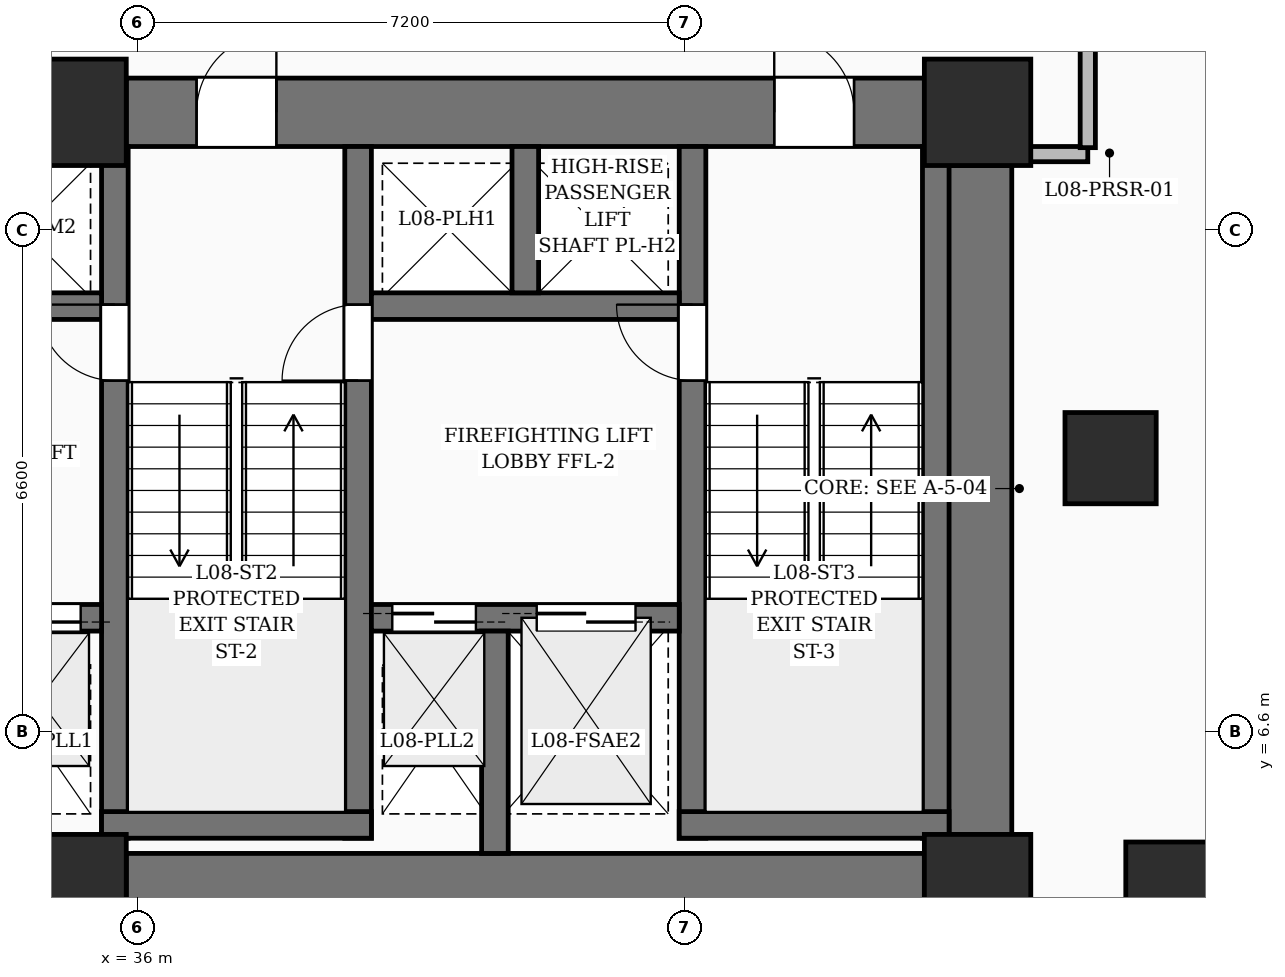
"""IFC4 building model, lengths in metres.
Left out: names, types, materials, properties, quantities, classifications, styles, units other than length and angle.
Written with IfcOpenShell. Run it as: python <this file> out.ifc"""

import sys

from ifc_helpers import new_model, si_unit, direction, frame, frame_2d, origin, origin_2d, place, context, subcontext, project, spatial, rectangle, extrude, element, fill, save


model = new_model("IFC4")
c1 = context("Model", 3, precision=1e-05, world=origin(), true_north=direction((0.0, 1.0)))
c2 = subcontext(c1, "Body", "Model", "MODEL_VIEW")
j1 = project(units=[si_unit("LENGTHUNIT", "METRE"), si_unit("PLANEANGLEUNIT", "RADIAN")], contexts=[c1])
p1 = place(None, origin())
s1 = spatial("IfcSite", under=j1, at=p1, CompositionType="ELEMENT")
p2 = place(p1, origin())
s2 = spatial("IfcBuilding", under=s1, at=p2, CompositionType="ELEMENT")
p3 = place(p2, frame((0.0, 0.0, 39.0)))
s3 = spatial("IfcBuildingStorey", under=s2, at=p3, CompositionType="ELEMENT", Elevation=39.0)
for number, where, z_axis, x_axis in (
    (1, (35.15, 4.55, 0.0), (0.0, 0.0, 1.0), (1.0, 0.0, 0.0)),
    (2, (47.05, 4.55, 0.0), (0.0, 0.0, 1.0), (1.0, 0.0, 0.0)),
    (3, (35.15, 14.75, 0.0), (0.0, 0.0, 1.0), (1.0, 0.0, 0.0)),
    (4, (47.05, 14.75, 0.0), (0.0, 0.0, 1.0), (1.0, 0.0, 0.0)),
):
    element("IfcColumn", number, at=place(p3, frame(where, z_axis=z_axis, x_axis=x_axis)), inside=s3, PredefinedType="COLUMN", context=c2, shape_type="SweptSolid", body=[
        extrude(rectangle(XDim=1.4, YDim=1.4, at=origin_2d()), origin(), (0.0, 0.0, 1.0), 3.6),
    ])
for number, where, z_axis, x_axis in (
    (5, (49.6, 4.55, 0.0), (0.0, 0.0, 1.0), (1.0, 0.0, 0.0)),
    (6, (48.8, 10.2, 0.0), (0.0, 0.0, 1.0), (1.0, 0.0, 0.0)),
):
    element("IfcColumn", number, at=place(p3, frame(where, z_axis=z_axis, x_axis=x_axis)), inside=s3, PredefinedType="COLUMN", context=c2, shape_type="SweptSolid", body=[
        extrude(rectangle(XDim=1.2, YDim=1.2, at=origin_2d()), origin(), (0.0, 0.0, 1.0), 3.6),
    ])
p4 = place(p3, frame((35.85, 4.55, 0.0), z_axis=(0.0, 0.0, 1.0), x_axis=(1.0, 0.0, 0.0)))
e7 = element("IfcWall", 7, at=p4, inside=s3, PredefinedType="SHEAR", context=c2, shape_type="SweptSolid", body=[
    extrude(rectangle(XDim=10.5, YDim=0.9, at=frame_2d((5.25, 0.0))), origin(), (0.0, 0.0, 1.0), 3.6),
])
p5 = place(p3, frame((35.85, 14.75, 0.0), z_axis=(0.0, 0.0, 1.0), x_axis=(1.0, 0.0, 0.0)))
e8 = element("IfcWall", 8, at=p5, inside=s3, PredefinedType="SHEAR", context=c2, shape_type="SweptSolid", body=[
    extrude(rectangle(XDim=10.5, YDim=0.9, at=frame_2d((5.25, 0.0))), origin(), (0.0, 0.0, 1.0), 3.6),
])
p6 = place(p5, frame((0.925, 0.0, 0.0)))
e9 = element("IfcOpeningElement", 9, at=p6, cuts=e8, PredefinedType="OPENING", context=c2, shape_type="SweptSolid", body=[
    extrude(rectangle(XDim=1.05, YDim=2.15, at=frame_2d((0.525, 1.075))), frame((0.0, 0.46, 0.0), z_axis=(0.0, -1.0, 0.0), x_axis=(1.0, 0.0, 0.0)), (0.0, 0.0, 1.0), 0.92),
])
p7 = place(p5, frame((8.525, 0.0, 0.0)))
e10 = element("IfcOpeningElement", 10, at=p7, cuts=e8, PredefinedType="OPENING", context=c2, shape_type="SweptSolid", body=[
    extrude(rectangle(XDim=1.05, YDim=2.15, at=frame_2d((0.525, 1.075))), frame((0.0, 0.46, 0.0), z_axis=(0.0, -1.0, 0.0), x_axis=(1.0, 0.0, 0.0)), (0.0, 0.0, 1.0), 0.92),
])
p8 = place(p3, frame((47.05, 5.25, 0.0), z_axis=(0.0, 0.0, 1.0), x_axis=(0.0, 1.0, 0.0)))
e11 = element("IfcWall", 11, at=p8, inside=s3, PredefinedType="SHEAR", context=c2, shape_type="SweptSolid", body=[
    extrude(rectangle(XDim=8.8, YDim=0.9, at=frame_2d((4.4, 0.0))), origin(), (0.0, 0.0, 1.0), 3.6),
])
p9 = place(p3, frame((35.7, 5.2, 0.0), z_axis=(0.0, 0.0, 1.0), x_axis=(0.0, 1.0, 0.0)))
e12 = element("IfcWall", 12, at=p9, inside=s3, PredefinedType="SOLIDWALL", context=c2, shape_type="SweptSolid", body=[
    extrude(rectangle(XDim=9.1, YDim=0.35, at=frame_2d((4.55, 0.0))), origin(), (0.0, 0.0, 1.0), 3.6),
])
p10 = place(p9, frame((6.02, 0.0, 0.0)))
e13 = element("IfcOpeningElement", 13, at=p10, cuts=e12, PredefinedType="OPENING", context=c2, shape_type="SweptSolid", body=[
    extrude(rectangle(XDim=1.0, YDim=2.15, at=frame_2d((0.5, 1.075))), frame((0.0, 0.185, 0.0), z_axis=(0.0, -1.0, 0.0), x_axis=(1.0, 0.0, 0.0)), (0.0, 0.0, 1.0), 0.37),
])
p11 = place(p3, frame((38.9, 5.2, 0.0), z_axis=(0.0, 0.0, 1.0), x_axis=(0.0, 1.0, 0.0)))
e14 = element("IfcWall", 14, at=p11, inside=s3, PredefinedType="SOLIDWALL", context=c2, shape_type="SweptSolid", body=[
    extrude(rectangle(XDim=9.1, YDim=0.35, at=frame_2d((4.55, 0.0))), origin(), (0.0, 0.0, 1.0), 3.6),
])
p12 = place(p11, frame((6.02, 0.0, 0.0)))
e15 = element("IfcOpeningElement", 15, at=p12, cuts=e14, PredefinedType="OPENING", context=c2, shape_type="SweptSolid", body=[
    extrude(rectangle(XDim=1.0, YDim=2.15, at=frame_2d((0.5, 1.075))), frame((0.0, 0.185, 0.0), z_axis=(0.0, -1.0, 0.0), x_axis=(1.0, 0.0, 0.0)), (0.0, 0.0, 1.0), 0.37),
])
p13 = place(p3, frame((35.525, 5.375, 0.0), z_axis=(0.0, 0.0, 1.0), x_axis=(1.0, 0.0, 0.0)))
e16 = element("IfcWall", 16, at=p13, inside=s3, PredefinedType="SOLIDWALL", context=c2, shape_type="SweptSolid", body=[
    extrude(rectangle(XDim=3.55, YDim=0.35, at=frame_2d((1.775, 0.0))), origin(), (0.0, 0.0, 1.0), 3.6),
])
p14 = place(p3, frame((43.3, 5.2, 0.0), z_axis=(0.0, 0.0, 1.0), x_axis=(0.0, 1.0, 0.0)))
e17 = element("IfcWall", 17, at=p14, inside=s3, PredefinedType="SOLIDWALL", context=c2, shape_type="SweptSolid", body=[
    extrude(rectangle(XDim=9.1, YDim=0.35, at=frame_2d((4.55, 0.0))), origin(), (0.0, 0.0, 1.0), 3.6),
])
p15 = place(p14, frame((6.02, 0.0, 0.0)))
e18 = element("IfcOpeningElement", 18, at=p15, cuts=e17, PredefinedType="OPENING", context=c2, shape_type="SweptSolid", body=[
    extrude(rectangle(XDim=1.0, YDim=2.15, at=frame_2d((0.5, 1.075))), frame((0.0, 0.185, 0.0), z_axis=(0.0, -1.0, 0.0), x_axis=(1.0, 0.0, 0.0)), (0.0, 0.0, 1.0), 0.37),
])
p16 = place(p3, frame((46.5, 5.2, 0.0), z_axis=(0.0, 0.0, 1.0), x_axis=(0.0, 1.0, 0.0)))
e19 = element("IfcWall", 19, at=p16, inside=s3, PredefinedType="SOLIDWALL", context=c2, shape_type="SweptSolid", body=[
    extrude(rectangle(XDim=9.1, YDim=0.35, at=frame_2d((4.55, 0.0))), origin(), (0.0, 0.0, 1.0), 3.6),
])
p17 = place(p3, frame((43.125, 5.375, 0.0), z_axis=(0.0, 0.0, 1.0), x_axis=(1.0, 0.0, 0.0)))
e20 = element("IfcWall", 20, at=p17, inside=s3, PredefinedType="SOLIDWALL", context=c2, shape_type="SweptSolid", body=[
    extrude(rectangle(XDim=3.55, YDim=0.35, at=frame_2d((1.775, 0.0))), origin(), (0.0, 0.0, 1.0), 3.6),
])
p18 = place(p3, frame((31.475, 8.1, 0.0), z_axis=(0.0, 0.0, 1.0), x_axis=(1.0, 0.0, 0.0)))
e21 = element("IfcWall", 21, at=p18, inside=s3, PredefinedType="SOLIDWALL", context=c2, shape_type="SweptSolid", body=[
    extrude(rectangle(XDim=4.05, YDim=0.35, at=frame_2d((2.025, 0.0))), origin(), (0.0, 0.0, 1.0), 3.6),
])
p19 = place(p18, frame((0.575, 0.0, 0.0)))
e22 = element("IfcOpeningElement", 22, at=p19, cuts=e21, PredefinedType="OPENING", context=c2, shape_type="SweptSolid", body=[
    extrude(rectangle(XDim=1.3, YDim=2.25, at=frame_2d((0.65, 1.125))), frame((0.0, 0.185, 0.0), z_axis=(0.0, -1.0, 0.0), x_axis=(1.0, 0.0, 0.0)), (0.0, 0.0, 1.0), 0.37),
])
p20 = place(p18, frame((2.675, 0.0, 0.0)))
e23 = element("IfcOpeningElement", 23, at=p20, cuts=e21, PredefinedType="OPENING", context=c2, shape_type="SweptSolid", body=[
    extrude(rectangle(XDim=1.1, YDim=2.2, at=frame_2d((0.55, 1.1))), frame((0.0, 0.185, 0.0), z_axis=(0.0, -1.0, 0.0), x_axis=(1.0, 0.0, 0.0)), (0.0, 0.0, 1.0), 0.37),
])
p21 = place(p3, frame((39.075, 8.1, 0.0), z_axis=(0.0, 0.0, 1.0), x_axis=(1.0, 0.0, 0.0)))
e24 = element("IfcWall", 24, at=p21, inside=s3, PredefinedType="SOLIDWALL", context=c2, shape_type="SweptSolid", body=[
    extrude(rectangle(XDim=4.05, YDim=0.35, at=frame_2d((2.025, 0.0))), origin(), (0.0, 0.0, 1.0), 3.6),
])
p22 = place(p21, frame((2.175, 0.0, 0.0)))
e25 = element("IfcOpeningElement", 25, at=p22, cuts=e24, PredefinedType="OPENING", context=c2, shape_type="SweptSolid", body=[
    extrude(rectangle(XDim=1.3, YDim=2.25, at=frame_2d((0.65, 1.125))), frame((0.0, 0.185, 0.0), z_axis=(0.0, -1.0, 0.0), x_axis=(1.0, 0.0, 0.0)), (0.0, 0.0, 1.0), 0.37),
])
p23 = place(p21, frame((0.275, 0.0, 0.0)))
e26 = element("IfcOpeningElement", 26, at=p23, cuts=e24, PredefinedType="OPENING", context=c2, shape_type="SweptSolid", body=[
    extrude(rectangle(XDim=1.1, YDim=2.2, at=frame_2d((0.55, 1.1))), frame((0.0, 0.185, 0.0), z_axis=(0.0, -1.0, 0.0), x_axis=(1.0, 0.0, 0.0)), (0.0, 0.0, 1.0), 0.37),
])
p24 = place(p3, frame((40.7, 5.0, 0.0), z_axis=(0.0, 0.0, 1.0), x_axis=(0.0, 1.0, 0.0)))
e27 = element("IfcWall", 27, at=p24, inside=s3, PredefinedType="SOLIDWALL", context=c2, shape_type="SweptSolid", body=[
    extrude(rectangle(XDim=2.925, YDim=0.35, at=frame_2d((1.462, 0.0))), origin(), (0.0, 0.0, 1.0), 3.6),
])
p25 = place(p3, frame((31.475, 12.2, 0.0), z_axis=(0.0, 0.0, 1.0), x_axis=(1.0, 0.0, 0.0)))
e28 = element("IfcWall", 28, at=p25, inside=s3, PredefinedType="SOLIDWALL", context=c2, shape_type="SweptSolid", body=[
    extrude(rectangle(XDim=4.05, YDim=0.35, at=frame_2d((2.025, 0.0))), origin(), (0.0, 0.0, 1.0), 3.6),
])
p26 = place(p3, frame((39.075, 12.2, 0.0), z_axis=(0.0, 0.0, 1.0), x_axis=(1.0, 0.0, 0.0)))
e29 = element("IfcWall", 29, at=p26, inside=s3, PredefinedType="SOLIDWALL", context=c2, shape_type="SweptSolid", body=[
    extrude(rectangle(XDim=4.05, YDim=0.35, at=frame_2d((2.025, 0.0))), origin(), (0.0, 0.0, 1.0), 3.6),
])
p27 = place(p3, frame((41.1, 12.375, 0.0), z_axis=(0.0, 0.0, 1.0), x_axis=(0.0, 1.0, 0.0)))
e30 = element("IfcWall", 30, at=p27, inside=s3, PredefinedType="SOLIDWALL", context=c2, shape_type="SweptSolid", body=[
    extrude(rectangle(XDim=1.925, YDim=0.35, at=frame_2d((0.962, 0.0))), origin(), (0.0, 0.0, 1.0), 3.6),
])
p28 = place(p3, frame((47.5, 14.2, 0.0), z_axis=(0.0, 0.0, 1.0), x_axis=(1.0, 0.0, 0.0)))
e31 = element("IfcWall", 31, at=p28, inside=s3, PredefinedType="PARTITIONING", context=c2, shape_type="SweptSolid", body=[
    extrude(rectangle(XDim=1.0, YDim=0.2, at=frame_2d((0.5, 0.0))), origin(), (0.0, 0.0, 1.0), 3.35),
])
p29 = place(p3, frame((48.5, 14.285, 0.0), z_axis=(0.0, 0.0, 1.0), x_axis=(0.0, 1.0, 0.0)))
e32 = element("IfcWall", 32, at=p29, inside=s3, PredefinedType="PARTITIONING", context=c2, shape_type="SweptSolid", body=[
    extrude(rectangle(XDim=3.38, YDim=0.2, at=frame_2d((1.69, 0.0))), origin(), (0.0, 0.0, 1.0), 2.279),
])
p30 = place(p6, origin())
e33 = element("IfcDoor", 33, at=p30, inside=s3, OperationType="SINGLE_SWING_RIGHT", PredefinedType="DOOR", context=c2, shape_type="SweptSolid", body=[
    extrude(rectangle(XDim=1.05, YDim=2.15, at=frame_2d((0.525, 1.075))), frame((0.0, 0.025, 0.0), z_axis=(0.0, -1.0, 0.0), x_axis=(1.0, 0.0, 0.0)), (0.0, 0.0, 1.0), 0.05),
])
fill(e9, e33)
p31 = place(p7, origin())
e34 = element("IfcDoor", 34, at=p31, inside=s3, OperationType="SINGLE_SWING_LEFT", PredefinedType="DOOR", context=c2, shape_type="SweptSolid", body=[
    extrude(rectangle(XDim=1.05, YDim=2.15, at=frame_2d((0.525, 1.075))), frame((0.0, 0.025, 0.0), z_axis=(0.0, -1.0, 0.0), x_axis=(1.0, 0.0, 0.0)), (0.0, 0.0, 1.0), 0.05),
])
fill(e10, e34)
p32 = place(p10, origin())
e35 = element("IfcDoor", 35, at=p32, inside=s3, OperationType="SINGLE_SWING_RIGHT", PredefinedType="DOOR", context=c2, shape_type="SweptSolid", body=[
    extrude(rectangle(XDim=1.0, YDim=2.15, at=frame_2d((0.5, 1.075))), frame((0.0, 0.025, 0.0), z_axis=(0.0, -1.0, 0.0), x_axis=(1.0, 0.0, 0.0)), (0.0, 0.0, 1.0), 0.05),
])
fill(e13, e35)
p33 = place(p12, origin())
e36 = element("IfcDoor", 36, at=p33, inside=s3, OperationType="SINGLE_SWING_LEFT", PredefinedType="DOOR", context=c2, shape_type="SweptSolid", body=[
    extrude(rectangle(XDim=1.0, YDim=2.15, at=frame_2d((0.5, 1.075))), frame((0.0, 0.025, 0.0), z_axis=(0.0, -1.0, 0.0), x_axis=(1.0, 0.0, 0.0)), (0.0, 0.0, 1.0), 0.05),
])
fill(e15, e36)
p34 = place(p15, origin())
e37 = element("IfcDoor", 37, at=p34, inside=s3, OperationType="SINGLE_SWING_RIGHT", PredefinedType="DOOR", context=c2, shape_type="SweptSolid", body=[
    extrude(rectangle(XDim=1.0, YDim=2.15, at=frame_2d((0.5, 1.075))), frame((0.0, 0.025, 0.0), z_axis=(0.0, -1.0, 0.0), x_axis=(1.0, 0.0, 0.0)), (0.0, 0.0, 1.0), 0.05),
])
fill(e18, e37)
p35 = place(p22, origin())
e38 = element("IfcDoor", 38, at=p35, inside=s3, OperationType="DOUBLE_DOOR_SLIDING", PredefinedType="DOOR", context=c2, shape_type="SweptSolid", body=[
    extrude(rectangle(XDim=1.3, YDim=2.25, at=frame_2d((0.65, 1.125))), frame((0.0, 0.025, 0.0), z_axis=(0.0, -1.0, 0.0), x_axis=(1.0, 0.0, 0.0)), (0.0, 0.0, 1.0), 0.05),
])
fill(e25, e38)
p36 = place(p20, origin())
e39 = element("IfcDoor", 39, at=p36, inside=s3, OperationType="DOUBLE_DOOR_SLIDING", PredefinedType="DOOR", context=c2, shape_type="SweptSolid", body=[
    extrude(rectangle(XDim=1.1, YDim=2.2, at=frame_2d((0.55, 1.1))), frame((0.0, 0.025, 0.0), z_axis=(0.0, -1.0, 0.0), x_axis=(1.0, 0.0, 0.0)), (0.0, 0.0, 1.0), 0.05),
])
fill(e23, e39)
p37 = place(p23, origin())
e40 = element("IfcDoor", 40, at=p37, inside=s3, OperationType="DOUBLE_DOOR_SLIDING", PredefinedType="DOOR", context=c2, shape_type="SweptSolid", body=[
    extrude(rectangle(XDim=1.1, YDim=2.2, at=frame_2d((0.55, 1.1))), frame((0.0, 0.025, 0.0), z_axis=(0.0, -1.0, 0.0), x_axis=(1.0, 0.0, 0.0)), (0.0, 0.0, 1.0), 0.05),
])
fill(e26, e40)
save(model, sys.argv[1])
